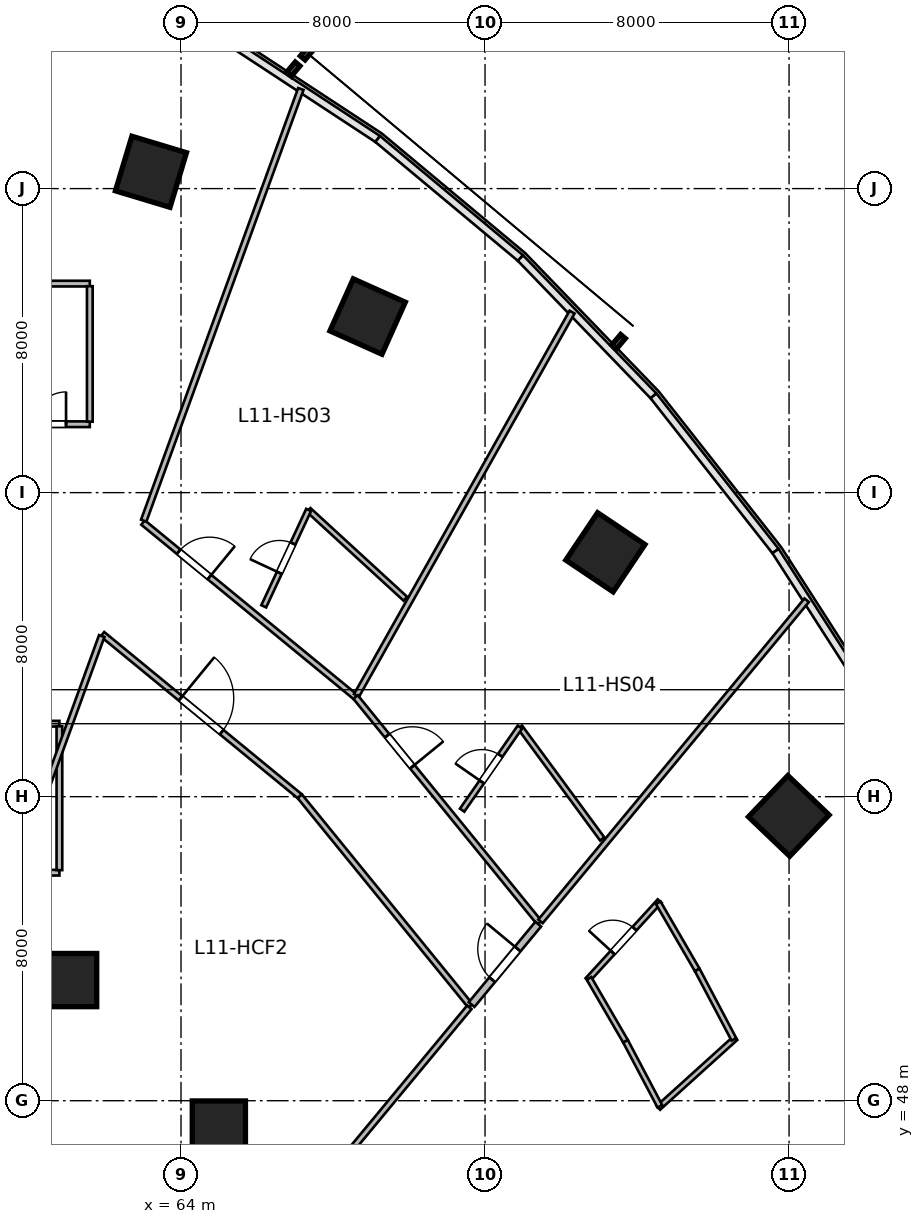
"""IFC4 building model, lengths in metres.
Left out: names, types, materials, properties, quantities, classifications, styles, units other than length and angle.
Written with IfcOpenShell. Run it as: python <this file> out.ifc"""

import sys

from ifc_helpers import new_model, si_unit, direction, frame, frame_2d, origin, origin_2d, place, context, subcontext, project, spatial, rectangle, circle, extrude, source, transform, mapped, element, fill, save


model = new_model("IFC4")
c1 = context("Model", 3, precision=1e-05, world=origin(), true_north=direction((0.0, 1.0)))
c2 = subcontext(c1, "Body", "Model", "MODEL_VIEW")
j1 = project(units=[si_unit("LENGTHUNIT", "METRE"), si_unit("PLANEANGLEUNIT", "RADIAN")], contexts=[c1])
p1 = place(None, origin())
s1 = spatial("IfcSite", under=j1, at=p1, CompositionType="ELEMENT")
p2 = place(p1, origin())
s2 = spatial("IfcBuilding", under=s1, at=p2, CompositionType="ELEMENT")
p3 = place(p2, frame((0.0, 0.0, 53.4)))
s3 = spatial("IfcBuildingStorey", under=s2, at=p3, CompositionType="ELEMENT", Elevation=53.4)
m1 = source(origin(), c2, "Body", "SweptSolid", [
    extrude(rectangle(XDim=1.5, YDim=1.5, at=origin_2d()), origin(), (0.0, 0.0, 1.0), 3.6),
])
p4 = place(p3, frame((63.209, 72.442, 0.0), z_axis=(0.0, 0.0, 1.0), x_axis=(0.288697611798, 0.957420330337, 0.0)))
e1 = element("IfcColumn", 1, at=p4, inside=s3, PredefinedType="COLUMN", context=c2, shape_type="MappedRepresentation", body=[
    mapped(m1, transform((0.0, 0.0, 0.0), scale=1.0)),
])
m2 = source(origin(), c2, "Body", "SweptSolid", [
    extrude(circle(Radius=0.7, at=origin_2d()), origin(), (0.0, 0.0, 1.0), 3.6),
])
p5 = place(p3, frame((61.082, 51.175, 0.0), z_axis=(0.0, 0.0, 1.0), x_axis=(0.409126902895, 0.912477494148, 0.0)))
e2 = element("IfcColumn", 2, at=p5, inside=s3, PredefinedType="COLUMN", context=c2, shape_type="MappedRepresentation", body=[
    mapped(m2, transform((0.0, 0.0, 0.0), scale=1.0)),
])
p6 = place(p3, frame((68.91, 68.633, 0.0), z_axis=(0.0, 0.0, 1.0), x_axis=(0.409126902895, 0.912477494148, 0.0)))
e3 = element("IfcColumn", 3, at=p6, inside=s3, PredefinedType="COLUMN", context=c2, shape_type="MappedRepresentation", body=[
    mapped(m1, transform((0.0, 0.0, 0.0), scale=1.0)),
])
p7 = place(p3, frame((64.996, 47.294, 0.0), z_axis=(0.0, 0.0, 1.0), x_axis=(0.55774510898, 0.830012285095, 0.0)))
e4 = element("IfcColumn", 4, at=p7, inside=s3, PredefinedType="COLUMN", context=c2, shape_type="MappedRepresentation", body=[
    mapped(m2, transform((0.0, 0.0, 0.0), scale=1.0)),
])
for number, where, z_axis, x_axis in (
    (5, (75.167, 62.43, 0.0), (0.0, 0.0, 1.0), (0.558, 0.83, 0.0)),
    (6, (79.993, 55.494, 0.0), (0.0, 0.0, 1.0), (0.691, 0.723, 0.0)),
):
    element("IfcColumn", number, at=place(p3, frame(where, z_axis=z_axis, x_axis=x_axis)), inside=s3, PredefinedType="COLUMN", context=c2, shape_type="MappedRepresentation", body=[
        mapped(m1, transform((0.0, 0.0, 0.0), scale=1.0)),
    ])
m3 = source(origin(), c2, "Body", "SweptSolid", [
    extrude(rectangle(XDim=2.1, YDim=0.15, at=frame_2d((1.05, 0.0))), origin(), (0.0, 0.0, 1.0), 3.36),
])
p8 = place(p3, frame((59.5, 65.8, 0.0), z_axis=(0.0, 0.0, 1.0), x_axis=(1.0, 0.0, 0.0)))
e7 = element("IfcWall", 7, at=p8, inside=s3, PredefinedType="PARTITIONING", context=c2, shape_type="MappedRepresentation", body=[
    mapped(m3, transform((0.0, 0.0, 0.0), scale=1.0)),
])
p9 = place(p8, frame((0.625, 0.0, 0.0)))
e8 = element("IfcOpeningElement", 8, at=p9, cuts=e7, PredefinedType="OPENING", context=c2, shape_type="SweptSolid", body=[
    extrude(rectangle(XDim=0.85, YDim=2.1, at=frame_2d((0.425, 1.05))), frame((0.0, 0.085, 0.0), z_axis=(0.0, -1.0, 0.0), x_axis=(1.0, 0.0, 0.0)), (0.0, 0.0, 1.0), 0.17),
])
p10 = place(p3, frame((59.5, 69.5, 0.0), z_axis=(0.0, 0.0, 1.0), x_axis=(1.0, 0.0, 0.0)))
e9 = element("IfcWall", 9, at=p10, inside=s3, PredefinedType="PARTITIONING", context=c2, shape_type="MappedRepresentation", body=[
    mapped(m3, transform((0.0, 0.0, 0.0), scale=1.0)),
])
m4 = source(origin(), c2, "Body", "SweptSolid", [
    extrude(rectangle(XDim=3.565, YDim=0.15, at=frame_2d((1.783, 0.0))), origin(), (0.0, 0.0, 1.0), 3.36),
])
p11 = place(p3, frame((61.6, 65.867, 0.0), z_axis=(0.0, 0.0, 1.0), x_axis=(0.0, 1.0, 0.0)))
e10 = element("IfcWall", 10, at=p11, inside=s3, PredefinedType="PARTITIONING", context=c2, shape_type="MappedRepresentation", body=[
    mapped(m4, transform((0.0, 0.0, 0.0), scale=1.0)),
])
m5 = source(origin(), c2, "Body", "SweptSolid", [
    extrude(rectangle(XDim=6.6, YDim=0.15, at=frame_2d((3.3, 0.0))), origin(), (0.0, 0.0, 1.0), 2.803),
])
p12 = place(p3, frame((54.2, 54.0, 0.0), z_axis=(0.0, 0.0, 1.0), x_axis=(1.0, 0.0, 0.0)))
e11 = element("IfcWall", 11, at=p12, inside=s3, PredefinedType="PARTITIONING", context=c2, shape_type="MappedRepresentation", body=[
    mapped(m5, transform((0.0, 0.0, 0.0), scale=1.0)),
])
m6 = source(origin(), c2, "Body", "SweptSolid", [
    extrude(rectangle(XDim=6.6, YDim=0.15, at=frame_2d((3.3, 0.0))), origin(), (0.0, 0.0, 1.0), 3.36),
])
p13 = place(p3, frame((54.2, 57.92, 0.0), z_axis=(0.0, 0.0, 1.0), x_axis=(1.0, 0.0, 0.0)))
e12 = element("IfcWall", 12, at=p13, inside=s3, PredefinedType="PARTITIONING", context=c2, shape_type="MappedRepresentation", body=[
    mapped(m6, transform((0.0, 0.0, 0.0), scale=1.0)),
])
p14 = place(p13, frame((2.825, 0.0, 0.0)))
e13 = element("IfcOpeningElement", 13, at=p14, cuts=e12, PredefinedType="OPENING", context=c2, shape_type="SweptSolid", body=[
    extrude(rectangle(XDim=0.95, YDim=2.1, at=frame_2d((0.475, 1.05))), frame((0.0, 0.085, 0.0), z_axis=(0.0, -1.0, 0.0), x_axis=(1.0, 0.0, 0.0)), (0.0, 0.0, 1.0), 0.17),
])
m7 = source(origin(), c2, "Body", "SweptSolid", [
    extrude(rectangle(XDim=3.785, YDim=0.15, at=frame_2d((1.893, 0.0))), origin(), (0.0, 0.0, 1.0), 3.36),
])
p15 = place(p3, frame((60.8, 54.067, 0.0), z_axis=(0.0, 0.0, 1.0), x_axis=(0.0, 1.0, 0.0)))
e14 = element("IfcWall", 14, at=p15, inside=s3, PredefinedType="PARTITIONING", context=c2, shape_type="MappedRepresentation", body=[
    mapped(m7, transform((0.0, 0.0, 0.0), scale=1.0)),
])
m8 = source(origin(), c2, "Body", "SweptSolid", [
    extrude(rectangle(XDim=7.237, YDim=0.15, at=frame_2d((3.618, 0.0))), origin(), (0.0, 0.0, 1.0), 3.36),
])
p16 = place(p3, frame((63.001, 63.214, 0.0), z_axis=(0.0, 0.0, 1.0), x_axis=(0.772813707793, -0.634632943557, 0.0)))
e15 = element("IfcWall", 15, at=p16, inside=s3, PredefinedType="PARTITIONING", context=c2, shape_type="MappedRepresentation", body=[
    mapped(m8, transform((0.0, 0.0, 0.0), scale=1.0)),
])
p17 = place(p16, frame((1.212, 0.0, 0.0)))
e16 = element("IfcOpeningElement", 16, at=p17, cuts=e15, PredefinedType="OPENING", context=c2, shape_type="SweptSolid", body=[
    extrude(rectangle(XDim=1.05, YDim=2.15, at=frame_2d((0.525, 1.075))), frame((0.0, 0.085, 0.0), z_axis=(0.0, -1.0, 0.0), x_axis=(1.0, 0.0, 0.0)), (0.0, 0.0, 1.0), 0.17),
])
m9 = source(origin(), c2, "Body", "SweptSolid", [
    extrude(rectangle(XDim=12.088, YDim=0.15, at=frame_2d((6.044, 0.0))), origin(), (0.0, 0.0, 1.0), 3.36),
])
p18 = place(p3, frame((63.019, 63.262, 0.0), z_axis=(0.0, 0.0, 1.0), x_axis=(0.34203007529, 0.939689005787, 0.0)))
e17 = element("IfcWall", 17, at=p18, inside=s3, PredefinedType="PARTITIONING", context=c2, shape_type="MappedRepresentation", body=[
    mapped(m9, transform((0.0, 0.0, 0.0), scale=1.0)),
])
m10 = source(origin(), c2, "Body", "SweptSolid", [
    extrude(rectangle(XDim=11.573, YDim=0.15, at=frame_2d((5.786, 0.0))), origin(), (0.0, 0.0, 1.0), 3.36),
])
p19 = place(p3, frame((68.618, 58.664, 0.0), z_axis=(0.0, 0.0, 1.0), x_axis=(0.490161073951, 0.871631872744, 0.0)))
e18 = element("IfcWall", 18, at=p19, inside=s3, PredefinedType="PARTITIONING", context=c2, shape_type="MappedRepresentation", body=[
    mapped(m10, transform((0.0, 0.0, 0.0), scale=1.0)),
])
m11 = source(origin(), c2, "Body", "SweptSolid", [
    extrude(rectangle(XDim=3.456, YDim=0.14, at=frame_2d((1.728, 0.0))), origin(), (0.0, 0.0, 1.0), 3.36),
])
p20 = place(p3, frame((67.358, 63.544, 0.0), z_axis=(0.0, 0.0, 1.0), x_axis=(0.736860870293, -0.676044420013, 0.0)))
e19 = element("IfcWall", 19, at=p20, inside=s3, PredefinedType="PARTITIONING", context=c2, shape_type="MappedRepresentation", body=[
    mapped(m11, transform((0.0, 0.0, 0.0), scale=1.0)),
])
m12 = source(origin(), c2, "Body", "SweptSolid", [
    extrude(rectangle(XDim=2.796, YDim=0.14, at=frame_2d((1.398, 0.0))), origin(), (0.0, 0.0, 1.0), 3.36),
])
p21 = place(p3, frame((66.177, 61.009, 0.0), z_axis=(0.0, 0.0, 1.0), x_axis=(0.422316594955, 0.906448395456, 0.0)))
e20 = element("IfcWall", 20, at=p21, inside=s3, PredefinedType="PARTITIONING", context=c2, shape_type="MappedRepresentation", body=[
    mapped(m12, transform((0.0, 0.0, 0.0), scale=1.0)),
])
p22 = place(p21, frame((0.973, 0.0, 0.0)))
e21 = element("IfcOpeningElement", 21, at=p22, cuts=e20, PredefinedType="OPENING", context=c2, shape_type="SweptSolid", body=[
    extrude(rectangle(XDim=0.85, YDim=2.05, at=frame_2d((0.425, 1.025))), frame((0.0, 0.08, 0.0), z_axis=(0.0, -1.0, 0.0), x_axis=(1.0, 0.0, 0.0)), (0.0, 0.0, 1.0), 0.16),
])
m13 = source(origin(), c2, "Body", "SweptSolid", [
    extrude(rectangle(XDim=7.659, YDim=0.15, at=frame_2d((3.829, 0.0))), origin(), (0.0, 0.0, 1.0), 3.36),
])
p23 = place(p3, frame((68.594, 58.621, 0.0), z_axis=(0.0, 0.0, 1.0), x_axis=(0.631489868862, -0.775384127723, 0.0)))
e22 = element("IfcWall", 22, at=p23, inside=s3, PredefinedType="PARTITIONING", context=c2, shape_type="MappedRepresentation", body=[
    mapped(m13, transform((0.0, 0.0, 0.0), scale=1.0)),
])
p24 = place(p23, frame((1.313, 0.0, 0.0)))
e23 = element("IfcOpeningElement", 23, at=p24, cuts=e22, PredefinedType="OPENING", context=c2, shape_type="SweptSolid", body=[
    extrude(rectangle(XDim=1.05, YDim=2.15, at=frame_2d((0.525, 1.075))), frame((0.0, 0.085, 0.0), z_axis=(0.0, -1.0, 0.0), x_axis=(1.0, 0.0, 0.0)), (0.0, 0.0, 1.0), 0.17),
])
m14 = source(origin(), c2, "Body", "SweptSolid", [
    extrude(rectangle(XDim=10.975, YDim=0.15, at=frame_2d((5.487, 0.0))), origin(), (0.0, 0.0, 1.0), 3.36),
])
p25 = place(p3, frame((73.46, 52.719, 0.0), z_axis=(0.0, 0.0, 1.0), x_axis=(0.638125265812, 0.769932558821, 0.0)))
e24 = element("IfcWall", 24, at=p25, inside=s3, PredefinedType="PARTITIONING", context=c2, shape_type="MappedRepresentation", body=[
    mapped(m14, transform((0.0, 0.0, 0.0), scale=1.0)),
])
m15 = source(origin(), c2, "Body", "SweptSolid", [
    extrude(rectangle(XDim=3.656, YDim=0.14, at=frame_2d((1.828, 0.0))), origin(), (0.0, 0.0, 1.0), 3.36),
])
p26 = place(p3, frame((72.918, 57.831, 0.0), z_axis=(0.0, 0.0, 1.0), x_axis=(0.592700141555, -0.805423206892, 0.0)))
e25 = element("IfcWall", 25, at=p26, inside=s3, PredefinedType="PARTITIONING", context=c2, shape_type="MappedRepresentation", body=[
    mapped(m15, transform((0.0, 0.0, 0.0), scale=1.0)),
])
m16 = source(origin(), c2, "Body", "SweptSolid", [
    extrude(rectangle(XDim=2.663, YDim=0.14, at=frame_2d((1.332, 0.0))), origin(), (0.0, 0.0, 1.0), 3.36),
])
p27 = place(p3, frame((71.397, 55.645, 0.0), z_axis=(0.0, 0.0, 1.0), x_axis=(0.570905989724, 0.821015438891, 0.0)))
e26 = element("IfcWall", 26, at=p27, inside=s3, PredefinedType="PARTITIONING", context=c2, shape_type="MappedRepresentation", body=[
    mapped(m16, transform((0.0, 0.0, 0.0), scale=1.0)),
])
p28 = place(p27, frame((0.906, 0.0, 0.0)))
e27 = element("IfcOpeningElement", 27, at=p28, cuts=e26, PredefinedType="OPENING", context=c2, shape_type="SweptSolid", body=[
    extrude(rectangle(XDim=0.85, YDim=2.05, at=frame_2d((0.425, 1.025))), frame((0.0, 0.08, 0.0), z_axis=(0.0, -1.0, 0.0), x_axis=(1.0, 0.0, 0.0)), (0.0, 0.0, 1.0), 0.16),
])
m17 = source(origin(), c2, "Body", "SweptSolid", [
    extrude(rectangle(XDim=6.721, YDim=0.15, at=frame_2d((3.361, 0.0))), origin(), (0.0, 0.0, 1.0), 3.36),
])
p29 = place(p3, frame((61.931, 60.275, 0.0), z_axis=(0.0, 0.0, 1.0), x_axis=(0.772828051199, -0.63461547671, 0.0)))
e28 = element("IfcWall", 28, at=p29, inside=s3, PredefinedType="PARTITIONING", context=c2, shape_type="MappedRepresentation", body=[
    mapped(m17, transform((0.0, 0.0, 0.0), scale=1.0)),
])
p30 = place(p29, frame((2.66, 0.0, 0.0)))
e29 = element("IfcOpeningElement", 29, at=p30, cuts=e28, PredefinedType="OPENING", context=c2, shape_type="SweptSolid", body=[
    extrude(rectangle(XDim=1.4, YDim=2.15, at=frame_2d((0.7, 1.075))), frame((0.0, 0.085, 0.0), z_axis=(0.0, -1.0, 0.0), x_axis=(1.0, 0.0, 0.0)), (0.0, 0.0, 1.0), 0.17),
])
m18 = source(origin(), c2, "Body", "SweptSolid", [
    extrude(rectangle(XDim=7.113, YDim=0.15, at=frame_2d((3.556, 0.0))), origin(), (0.0, 0.0, 1.0), 3.36),
])
p31 = place(p3, frame((67.126, 56.01, 0.0), z_axis=(0.0, 0.0, 1.0), x_axis=(0.63149032532, -0.775383755974, 0.0)))
e30 = element("IfcWall", 30, at=p31, inside=s3, PredefinedType="PARTITIONING", context=c2, shape_type="MappedRepresentation", body=[
    mapped(m18, transform((0.0, 0.0, 0.0), scale=1.0)),
])
m19 = source(origin(), c2, "Body", "SweptSolid", [
    extrude(rectangle(XDim=12.196, YDim=0.15, at=frame_2d((6.098, 0.0))), origin(), (0.0, 0.0, 1.0), 3.36),
])
p32 = place(p3, frame((57.742, 48.766, 0.0), z_axis=(0.0, 0.0, 1.0), x_axis=(0.342022711534, 0.939691686031, 0.0)))
e31 = element("IfcWall", 31, at=p32, inside=s3, PredefinedType="PARTITIONING", context=c2, shape_type="MappedRepresentation", body=[
    mapped(m19, transform((0.0, 0.0, 0.0), scale=1.0)),
])
m20 = source(origin(), c2, "Body", "SweptSolid", [
    extrude(rectangle(XDim=11.053, YDim=0.15, at=frame_2d((5.527, 0.0))), origin(), (0.0, 0.0, 1.0), 3.36),
])
p33 = place(p3, frame((64.534, 41.949, 0.0), z_axis=(0.0, 0.0, 1.0), x_axis=(0.638131235571, 0.769927611005, 0.0)))
e32 = element("IfcWall", 32, at=p33, inside=s3, PredefinedType="PARTITIONING", context=c2, shape_type="MappedRepresentation", body=[
    mapped(m20, transform((0.0, 0.0, 0.0), scale=1.0)),
])
m21 = source(origin(), c2, "Body", "SweptSolid", [
    extrude(rectangle(XDim=2.748, YDim=0.195, at=frame_2d((1.374, 0.0))), origin(), (0.0, 0.0, 1.0), 3.36),
])
p34 = place(p3, frame((71.647, 50.531, 0.0), z_axis=(0.0, 0.0, 1.0), x_axis=(0.638111168284, 0.769944242729, 0.0)))
e33 = element("IfcWall", 33, at=p34, inside=s3, PredefinedType="PARTITIONING", context=c2, shape_type="MappedRepresentation", body=[
    mapped(m21, transform((0.0, 0.0, 0.0), scale=1.0)),
])
p35 = place(p34, frame((0.849, 0.0, 0.0)))
e34 = element("IfcOpeningElement", 34, at=p35, cuts=e33, PredefinedType="OPENING", context=c2, shape_type="SweptSolid", body=[
    extrude(rectangle(XDim=1.05, YDim=2.15, at=frame_2d((0.525, 1.075))), frame((0.0, 0.107, 0.0), z_axis=(0.0, -1.0, 0.0), x_axis=(1.0, 0.0, 0.0)), (0.0, 0.0, 1.0), 0.215),
])
m22 = source(origin(), c2, "Body", "SweptSolid", [
    extrude(rectangle(XDim=2.812, YDim=0.14, at=frame_2d((1.406, 0.0))), origin(), (0.0, 0.0, 1.0), 3.36),
])
p36 = place(p3, frame((74.697, 51.177, 0.0), z_axis=(0.0, 0.0, 1.0), x_axis=(0.675119025852, 0.737708818527, 0.0)))
e35 = element("IfcWall", 35, at=p36, inside=s3, PredefinedType="PARTITIONING", context=c2, shape_type="MappedRepresentation", body=[
    mapped(m22, transform((0.0, 0.0, 0.0), scale=1.0)),
])
p37 = place(p36, frame((0.981, 0.0, 0.0)))
e36 = element("IfcOpeningElement", 36, at=p37, cuts=e35, PredefinedType="OPENING", context=c2, shape_type="SweptSolid", body=[
    extrude(rectangle(XDim=0.85, YDim=2.05, at=frame_2d((0.425, 1.025))), frame((0.0, 0.08, 0.0), z_axis=(0.0, -1.0, 0.0), x_axis=(1.0, 0.0, 0.0)), (0.0, 0.0, 1.0), 0.16),
])
m23 = source(origin(), c2, "Body", "SweptSolid", [
    extrude(rectangle(XDim=2.738, YDim=0.14, at=frame_2d((1.369, 0.0))), origin(), (0.0, 0.0, 1.0), 3.36),
])
p38 = place(p3, frame((76.56, 47.814, 0.0), z_axis=(0.0, 0.0, 1.0), x_axis=(0.741873676582, 0.670539669218, 0.0)))
e37 = element("IfcWall", 37, at=p38, inside=s3, PredefinedType="PARTITIONING", context=c2, shape_type="MappedRepresentation", body=[
    mapped(m23, transform((0.0, 0.0, 0.0), scale=1.0)),
])
m24 = source(origin(), c2, "Body", "SweptSolid", [
    extrude(rectangle(XDim=1.914, YDim=0.14, at=frame_2d((0.957, 0.0))), origin(), (0.0, 0.0, 1.0), 3.36),
])
p39 = place(p3, frame((74.736, 51.219, 0.0), z_axis=(0.0, 0.0, 1.0), x_axis=(0.502347790612, -0.864665656347, 0.0)))
e38 = element("IfcWall", 38, at=p39, inside=s3, PredefinedType="PARTITIONING", context=c2, shape_type="MappedRepresentation", body=[
    mapped(m24, transform((0.0, 0.0, 0.0), scale=1.0)),
])
m25 = source(origin(), c2, "Body", "SweptSolid", [
    extrude(rectangle(XDim=2.045, YDim=0.14, at=frame_2d((1.022, 0.0))), origin(), (0.0, 0.0, 1.0), 3.36),
])
p40 = place(p3, frame((76.557, 53.209, 0.0), z_axis=(0.0, 0.0, 1.0), x_axis=(0.5023112139, -0.864686905411, 0.0)))
e39 = element("IfcWall", 39, at=p40, inside=s3, PredefinedType="PARTITIONING", context=c2, shape_type="MappedRepresentation", body=[
    mapped(m25, transform((0.0, 0.0, 0.0), scale=1.0)),
])
m26 = source(origin(), c2, "Body", "SweptSolid", [
    extrude(rectangle(XDim=1.936, YDim=0.14, at=frame_2d((0.968, 0.0))), origin(), (0.0, 0.0, 1.0), 3.36),
])
p41 = place(p3, frame((75.697, 49.563, 0.0), z_axis=(0.0, 0.0, 1.0), x_axis=(0.467174971862, -0.884164886017, 0.0)))
e40 = element("IfcWall", 40, at=p41, inside=s3, PredefinedType="PARTITIONING", context=c2, shape_type="MappedRepresentation", body=[
    mapped(m26, transform((0.0, 0.0, 0.0), scale=1.0)),
])
m27 = source(origin(), c2, "Body", "SweptSolid", [
    extrude(rectangle(XDim=2.068, YDim=0.14, at=frame_2d((1.034, 0.0))), origin(), (0.0, 0.0, 1.0), 3.36),
])
p42 = place(p3, frame((77.584, 51.441, 0.0), z_axis=(0.0, 0.0, 1.0), x_axis=(0.467215057643, -0.884143704333, 0.0)))
e41 = element("IfcWall", 41, at=p42, inside=s3, PredefinedType="PARTITIONING", context=c2, shape_type="MappedRepresentation", body=[
    mapped(m27, transform((0.0, 0.0, 0.0), scale=1.0)),
])
m28 = source(origin(), c2, "Body", "SweptSolid", [
    extrude(rectangle(XDim=0.85, YDim=2.1, at=frame_2d((0.425, 1.05))), frame((0.0, 0.025, 0.0), z_axis=(0.0, -1.0, 0.0), x_axis=(1.0, 0.0, 0.0)), (0.0, 0.0, 1.0), 0.05),
])
p43 = place(p9, origin())
e42 = element("IfcDoor", 42, at=p43, inside=s3, OperationType="SINGLE_SWING_RIGHT", PredefinedType="DOOR", context=c2, shape_type="MappedRepresentation", body=[
    mapped(m28, transform((0.0, 0.0, 0.0), scale=1.0)),
])
fill(e8, e42)
m29 = source(origin(), c2, "Body", "SweptSolid", [
    extrude(rectangle(XDim=1.05, YDim=2.15, at=frame_2d((0.525, 1.075))), frame((0.0, 0.025, 0.0), z_axis=(0.0, -1.0, 0.0), x_axis=(1.0, 0.0, 0.0)), (0.0, 0.0, 1.0), 0.05),
])
p44 = place(p17, origin())
e43 = element("IfcDoor", 43, at=p44, inside=s3, OperationType="SINGLE_SWING_RIGHT", PredefinedType="DOOR", context=c2, shape_type="MappedRepresentation", body=[
    mapped(m29, transform((0.0, 0.0, 0.0), scale=1.0)),
])
fill(e16, e43)
m30 = source(origin(), c2, "Body", "SweptSolid", [
    extrude(rectangle(XDim=0.85, YDim=2.05, at=frame_2d((0.425, 1.025))), frame((0.0, 0.025, 0.0), z_axis=(0.0, -1.0, 0.0), x_axis=(1.0, 0.0, 0.0)), (0.0, 0.0, 1.0), 0.05),
])
p45 = place(p22, origin())
e44 = element("IfcDoor", 44, at=p45, inside=s3, OperationType="SINGLE_SWING_LEFT", PredefinedType="DOOR", context=c2, shape_type="MappedRepresentation", body=[
    mapped(m30, transform((0.0, 0.0, 0.0), scale=1.0)),
])
fill(e21, e44)
p46 = place(p24, origin())
e45 = element("IfcDoor", 45, at=p46, inside=s3, OperationType="SINGLE_SWING_RIGHT", PredefinedType="DOOR", context=c2, shape_type="MappedRepresentation", body=[
    mapped(m29, transform((0.0, 0.0, 0.0), scale=1.0)),
])
fill(e23, e45)
p47 = place(p28, origin())
e46 = element("IfcDoor", 46, at=p47, inside=s3, OperationType="SINGLE_SWING_LEFT", PredefinedType="DOOR", context=c2, shape_type="MappedRepresentation", body=[
    mapped(m30, transform((0.0, 0.0, 0.0), scale=1.0)),
])
fill(e27, e46)
m31 = source(origin(), c2, "Body", "SweptSolid", [
    extrude(rectangle(XDim=1.4, YDim=2.15, at=frame_2d((0.7, 1.075))), frame((0.0, 0.025, 0.0), z_axis=(0.0, -1.0, 0.0), x_axis=(1.0, 0.0, 0.0)), (0.0, 0.0, 1.0), 0.05),
])
p48 = place(p30, origin())
e47 = element("IfcDoor", 47, at=p48, inside=s3, OperationType="SINGLE_SWING_LEFT", PredefinedType="DOOR", context=c2, shape_type="MappedRepresentation", body=[
    mapped(m31, transform((0.0, 0.0, 0.0), scale=1.0)),
])
fill(e29, e47)
p49 = place(p35, origin())
e48 = element("IfcDoor", 48, at=p49, inside=s3, OperationType="SINGLE_SWING_RIGHT", PredefinedType="DOOR", context=c2, shape_type="MappedRepresentation", body=[
    mapped(m29, transform((0.0, 0.0, 0.0), scale=1.0)),
])
fill(e34, e48)
p50 = place(p37, origin())
e49 = element("IfcDoor", 49, at=p50, inside=s3, OperationType="SINGLE_SWING_LEFT", PredefinedType="DOOR", context=c2, shape_type="MappedRepresentation", body=[
    mapped(m30, transform((0.0, 0.0, 0.0), scale=1.0)),
])
fill(e36, e49)
save(model, sys.argv[1])
